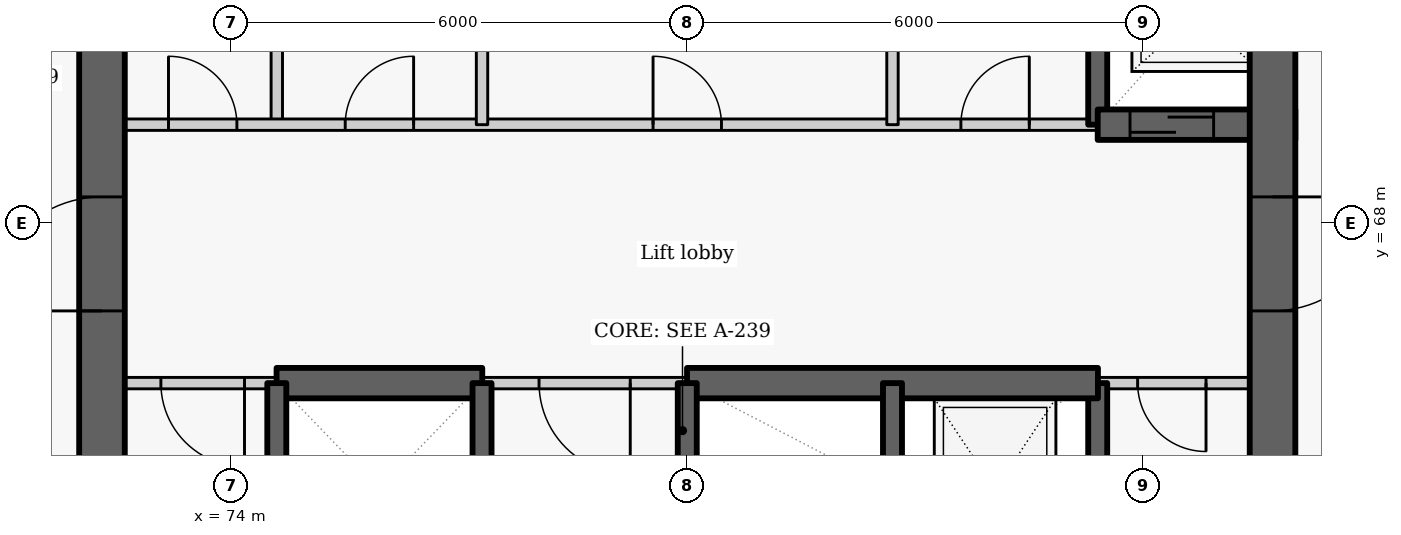
"""IFC4 building model, lengths in metres.
Left out: names, types, materials, properties, quantities, classifications, styles, units other than length and angle.
Written with IfcOpenShell. Run it as: python <this file> out.ifc"""

import sys

from ifc_helpers import new_model, si_unit, direction, frame, frame_2d, origin, place, context, subcontext, project, spatial, rectangle, extrude, element, fill, save


model = new_model("IFC4")
c1 = context("Model", 3, precision=1e-05, world=origin(), true_north=direction((0.0, 1.0)))
c2 = subcontext(c1, "Body", "Model", "MODEL_VIEW")
j1 = project(units=[si_unit("LENGTHUNIT", "METRE"), si_unit("PLANEANGLEUNIT", "RADIAN")], contexts=[c1])
p1 = place(None, origin())
s1 = spatial("IfcSite", under=j1, at=p1, CompositionType="ELEMENT")
p2 = place(p1, origin())
s2 = spatial("IfcBuilding", under=s1, at=p2, CompositionType="ELEMENT")
p3 = place(p2, frame((0.0, 0.0, 226.2)))
s3 = spatial("IfcBuildingStorey", under=s2, at=p3, CompositionType="ELEMENT", Elevation=226.2)
p4 = place(p3, frame((74.6, 69.3, 0.0), z_axis=(0.0, 0.0, 1.0), x_axis=(0.0, 1.0, 0.0)))
e1 = element("IfcWall", 1, at=p4, inside=s3, PredefinedType="PARTITIONING", context=c2, shape_type="SweptSolid", body=[
    extrude(rectangle(XDim=2.9, YDim=0.15, at=frame_2d((1.45, 0.0))), origin(), (0.0, 0.0, 1.0), 3.025),
])
p5 = place(p3, frame((72.0, 69.3, 0.0), z_axis=(0.0, 0.0, 1.0), x_axis=(1.0, 0.0, 0.0)))
e2 = element("IfcWall", 2, at=p5, inside=s3, PredefinedType="PARTITIONING", context=c2, shape_type="SweptSolid", body=[
    extrude(rectangle(XDim=13.4, YDim=0.15, at=frame_2d((6.7, 0.0))), origin(), (0.0, 0.0, 1.0), 3.025),
])
p6 = place(p5, frame((1.175, 0.0, 0.0)))
e3 = element("IfcOpeningElement", 3, at=p6, cuts=e2, PredefinedType="OPENING", context=c2, shape_type="SweptSolid", body=[
    extrude(rectangle(XDim=0.9, YDim=2.1, at=frame_2d((0.45, 1.05))), frame((0.0, 0.085, 0.0), z_axis=(0.0, -1.0, 0.0), x_axis=(1.0, 0.0, 0.0)), (0.0, 0.0, 1.0), 0.17),
])
p7 = place(p5, frame((3.5, 0.0, 0.0)))
e4 = element("IfcOpeningElement", 4, at=p7, cuts=e2, PredefinedType="OPENING", context=c2, shape_type="SweptSolid", body=[
    extrude(rectangle(XDim=0.9, YDim=2.1, at=frame_2d((0.45, 1.05))), frame((0.0, 0.085, 0.0), z_axis=(0.0, -1.0, 0.0), x_axis=(1.0, 0.0, 0.0)), (0.0, 0.0, 1.0), 0.17),
])
p8 = place(p5, frame((7.55, 0.0, 0.0)))
e5 = element("IfcOpeningElement", 5, at=p8, cuts=e2, PredefinedType="OPENING", context=c2, shape_type="SweptSolid", body=[
    extrude(rectangle(XDim=0.9, YDim=2.1, at=frame_2d((0.45, 1.05))), frame((0.0, 0.085, 0.0), z_axis=(0.0, -1.0, 0.0), x_axis=(1.0, 0.0, 0.0)), (0.0, 0.0, 1.0), 0.17),
])
p9 = place(p5, frame((11.6, 0.0, 0.0)))
e6 = element("IfcOpeningElement", 6, at=p9, cuts=e2, PredefinedType="OPENING", context=c2, shape_type="SweptSolid", body=[
    extrude(rectangle(XDim=0.9, YDim=2.1, at=frame_2d((0.45, 1.05))), frame((0.0, 0.085, 0.0), z_axis=(0.0, -1.0, 0.0), x_axis=(1.0, 0.0, 0.0)), (0.0, 0.0, 1.0), 0.17),
])
p10 = place(p3, frame((72.3, 63.1, -0.41), z_axis=(0.0, 0.0, 1.0), x_axis=(0.0, 1.0, 0.0)))
e7 = element("IfcWall", 7, at=p10, inside=s3, PredefinedType="SHEAR", context=c2, shape_type="SweptSolid", body=[
    extrude(rectangle(XDim=9.1, YDim=0.6, at=frame_2d((4.55, 0.0))), origin(), (0.0, 0.0, 1.0), 3.435),
])
p11 = place(p10, frame((3.75, 0.0, 0.41)))
e8 = element("IfcOpeningElement", 8, at=p11, cuts=e7, PredefinedType="OPENING", context=c2, shape_type="SweptSolid", body=[
    extrude(rectangle(XDim=1.5, YDim=2.1, at=frame_2d((0.75, 1.05))), frame((0.0, 0.31, 0.0), z_axis=(0.0, -1.0, 0.0), x_axis=(1.0, 0.0, 0.0)), (0.0, 0.0, 1.0), 0.62),
])
p12 = place(p3, frame((85.4, 63.1, -0.41), z_axis=(0.0, 0.0, 1.0), x_axis=(0.0, 1.0, 0.0)))
e9 = element("IfcWall", 9, at=p12, inside=s3, PredefinedType="SHEAR", context=c2, shape_type="SweptSolid", body=[
    extrude(rectangle(XDim=2.8, YDim=0.25, at=frame_2d((1.4, 0.0))), origin(), (0.0, 0.0, 1.0), 3.435),
])
p13 = place(p3, frame((85.4, 69.3, -0.41), z_axis=(0.0, 0.0, 1.0), x_axis=(0.0, 1.0, 0.0)))
e10 = element("IfcWall", 10, at=p13, inside=s3, PredefinedType="SHEAR", context=c2, shape_type="SweptSolid", body=[
    extrude(rectangle(XDim=2.9, YDim=0.25, at=frame_2d((1.45, 0.0))), origin(), (0.0, 0.0, 1.0), 3.435),
])
p14 = place(p3, frame((85.4, 69.3, -0.41), z_axis=(0.0, 0.0, 1.0), x_axis=(1.0, 0.0, 0.0)))
e11 = element("IfcWall", 11, at=p14, inside=s3, PredefinedType="SHEAR", context=c2, shape_type="SweptSolid", body=[
    extrude(rectangle(XDim=2.6, YDim=0.4, at=frame_2d((1.3, 0.0))), origin(), (0.0, 0.0, 1.0), 3.435),
])
p15 = place(p14, frame((0.425, 0.0, 0.41)))
e12 = element("IfcOpeningElement", 12, at=p15, cuts=e11, PredefinedType="OPENING", context=c2, shape_type="SweptSolid", body=[
    extrude(rectangle(XDim=1.1, YDim=2.1, at=frame_2d((0.55, 1.05))), frame((0.0, 0.21, 0.0), z_axis=(0.0, -1.0, 0.0), x_axis=(1.0, 0.0, 0.0)), (0.0, 0.0, 1.0), 0.42),
])
p16 = place(p3, frame((87.7, 72.2, -0.41), z_axis=(0.0, 0.0, 1.0), x_axis=(0.0, -1.0, 0.0)))
e13 = element("IfcWall", 13, at=p16, inside=s3, PredefinedType="SHEAR", context=c2, shape_type="SweptSolid", body=[
    extrude(rectangle(XDim=14.25, YDim=0.6, at=frame_2d((7.125, 0.0))), origin(), (0.0, 0.0, 1.0), 3.435),
])
p17 = place(p16, frame((3.85, 0.0, 0.41)))
e14 = element("IfcOpeningElement", 14, at=p17, cuts=e13, PredefinedType="OPENING", context=c2, shape_type="SweptSolid", body=[
    extrude(rectangle(XDim=1.5, YDim=2.1, at=frame_2d((0.75, 1.05))), frame((0.0, 0.31, 0.0), z_axis=(0.0, -1.0, 0.0), x_axis=(1.0, 0.0, 0.0)), (0.0, 0.0, 1.0), 0.62),
])
p18 = place(p16, frame((11.125, 0.0, 0.41)))
e15 = element("IfcOpeningElement", 15, at=p18, cuts=e13, PredefinedType="OPENING", context=c2, shape_type="SweptSolid", body=[
    extrude(rectangle(XDim=1.1, YDim=2.1, at=frame_2d((0.55, 1.05))), frame((0.0, 0.31, 0.0), z_axis=(0.0, -1.0, 0.0), x_axis=(1.0, 0.0, 0.0)), (0.0, 0.0, 1.0), 0.62),
])
for number, where, z_axis, x_axis in (
    (16, (77.3, 69.3, 0.0), (0.0, 0.0, 1.0), (0.0, 1.0, 0.0)),
    (17, (82.7, 69.3, 0.0), (0.0, 0.0, 1.0), (0.0, 1.0, 0.0)),
):
    element("IfcWall", number, at=place(p3, frame(where, z_axis=z_axis, x_axis=x_axis)), inside=s3, PredefinedType="PARTITIONING", context=c2, shape_type="SweptSolid", body=[
        extrude(rectangle(XDim=2.9, YDim=0.15, at=frame_2d((1.45, 0.0))), origin(), (0.0, 0.0, 1.0), 3.025),
    ])
p19 = place(p3, frame((74.603, 65.9, 0.0), z_axis=(0.0, 0.0, 1.0), x_axis=(-1.0, 0.0, 0.0)))
e18 = element("IfcWall", 18, at=p19, inside=s3, PredefinedType="PARTITIONING", context=c2, shape_type="SweptSolid", body=[
    extrude(rectangle(XDim=2.603, YDim=0.15, at=frame_2d((1.302, 0.0))), origin(), (0.0, 0.0, 1.0), 3.025),
])
p20 = place(p19, frame((0.428, 0.0, 0.0)))
e19 = element("IfcOpeningElement", 19, at=p20, cuts=e18, PredefinedType="OPENING", context=c2, shape_type="SweptSolid", body=[
    extrude(rectangle(XDim=1.1, YDim=2.1, at=frame_2d((0.55, 1.05))), frame((0.0, 0.085, 0.0), z_axis=(0.0, -1.0, 0.0), x_axis=(1.0, 0.0, 0.0)), (0.0, 0.0, 1.0), 0.17),
])
p21 = place(p3, frame((80.003, 65.9, 0.0), z_axis=(0.0, 0.0, 1.0), x_axis=(-1.0, 0.0, 0.0)))
e20 = element("IfcWall", 20, at=p21, inside=s3, PredefinedType="PARTITIONING", context=c2, shape_type="SweptSolid", body=[
    extrude(rectangle(XDim=2.706, YDim=0.15, at=frame_2d((1.353, 0.0))), origin(), (0.0, 0.0, 1.0), 3.025),
])
p22 = place(p21, frame((0.753, 0.0, 0.0)))
e21 = element("IfcOpeningElement", 21, at=p22, cuts=e20, PredefinedType="OPENING", context=c2, shape_type="SweptSolid", body=[
    extrude(rectangle(XDim=1.2, YDim=2.1, at=frame_2d((0.6, 1.05))), frame((0.0, 0.085, 0.0), z_axis=(0.0, -1.0, 0.0), x_axis=(1.0, 0.0, 0.0)), (0.0, 0.0, 1.0), 0.17),
])
p23 = place(p3, frame((88.0, 65.9, 0.0), z_axis=(0.0, 0.0, 1.0), x_axis=(-1.0, 0.0, 0.0)))
e22 = element("IfcWall", 22, at=p23, inside=s3, PredefinedType="PARTITIONING", context=c2, shape_type="SweptSolid", body=[
    extrude(rectangle(XDim=2.603, YDim=0.15, at=frame_2d((1.302, 0.0))), origin(), (0.0, 0.0, 1.0), 3.025),
])
p24 = place(p23, frame((1.175, 0.0, 0.0)))
e23 = element("IfcOpeningElement", 23, at=p24, cuts=e22, PredefinedType="OPENING", context=c2, shape_type="SweptSolid", body=[
    extrude(rectangle(XDim=0.9, YDim=2.1, at=frame_2d((0.45, 1.05))), frame((0.0, 0.085, 0.0), z_axis=(0.0, -1.0, 0.0), x_axis=(1.0, 0.0, 0.0)), (0.0, 0.0, 1.0), 0.17),
])
p25 = place(p3, frame((74.597, 65.9, -0.41), z_axis=(0.0, 0.0, 1.0), x_axis=(1.0, 0.0, 0.0)))
e24 = element("IfcWall", 24, at=p25, inside=s3, PredefinedType="SHEAR", context=c2, shape_type="SweptSolid", body=[
    extrude(rectangle(XDim=2.706, YDim=0.4, at=frame_2d((1.353, 0.0))), origin(), (0.0, 0.0, 1.0), 3.435),
])
p26 = place(p3, frame((79.997, 65.9, -0.41), z_axis=(0.0, 0.0, 1.0), x_axis=(1.0, 0.0, 0.0)))
e25 = element("IfcWall", 25, at=p26, inside=s3, PredefinedType="SHEAR", context=c2, shape_type="SweptSolid", body=[
    extrude(rectangle(XDim=5.406, YDim=0.4, at=frame_2d((2.703, 0.0))), origin(), (0.0, 0.0, 1.0), 3.435),
])
for number, where, z_axis, x_axis in (
    (26, (74.6, 63.1, -0.41), (0.0, 0.0, 1.0), (0.0, 1.0, 0.0)),
    (27, (77.3, 63.1, -0.41), (0.0, 0.0, 1.0), (0.0, 1.0, 0.0)),
    (28, (80.0, 63.1, -0.41), (0.0, 0.0, 1.0), (0.0, 1.0, 0.0)),
    (29, (82.7, 63.1, -0.41), (0.0, 0.0, 1.0), (0.0, 1.0, 0.0)),
):
    element("IfcWall", number, at=place(p3, frame(where, z_axis=z_axis, x_axis=x_axis)), inside=s3, PredefinedType="SHEAR", context=c2, shape_type="SweptSolid", body=[
        extrude(rectangle(XDim=2.8, YDim=0.25, at=frame_2d((1.4, 0.0))), origin(), (0.0, 0.0, 1.0), 3.435),
    ])
p27 = place(p6, origin())
e30 = element("IfcDoor", 30, at=p27, inside=s3, OperationType="SINGLE_SWING_LEFT", PredefinedType="DOOR", context=c2, shape_type="SweptSolid", body=[
    extrude(rectangle(XDim=0.9, YDim=2.1, at=frame_2d((0.45, 1.05))), frame((0.0, 0.025, 0.0), z_axis=(0.0, -1.0, 0.0), x_axis=(1.0, 0.0, 0.0)), (0.0, 0.0, 1.0), 0.05),
])
fill(e3, e30)
p28 = place(p15, origin())
e31 = element("IfcDoor", 31, at=p28, inside=s3, OperationType="SLIDING_TO_LEFT", PredefinedType="DOOR", context=c2, shape_type="SweptSolid", body=[
    extrude(rectangle(XDim=1.1, YDim=2.1, at=frame_2d((0.55, 1.05))), frame((0.0, 0.025, 0.0), z_axis=(0.0, -1.0, 0.0), x_axis=(1.0, 0.0, 0.0)), (0.0, 0.0, 1.0), 0.05),
])
fill(e12, e31)
p29 = place(p7, origin())
e32 = element("IfcDoor", 32, at=p29, inside=s3, OperationType="SINGLE_SWING_RIGHT", PredefinedType="DOOR", context=c2, shape_type="SweptSolid", body=[
    extrude(rectangle(XDim=0.9, YDim=2.1, at=frame_2d((0.45, 1.05))), frame((0.0, 0.025, 0.0), z_axis=(0.0, -1.0, 0.0), x_axis=(1.0, 0.0, 0.0)), (0.0, 0.0, 1.0), 0.05),
])
fill(e4, e32)
p30 = place(p8, origin())
e33 = element("IfcDoor", 33, at=p30, inside=s3, OperationType="SINGLE_SWING_LEFT", PredefinedType="DOOR", context=c2, shape_type="SweptSolid", body=[
    extrude(rectangle(XDim=0.9, YDim=2.1, at=frame_2d((0.45, 1.05))), frame((0.0, 0.025, 0.0), z_axis=(0.0, -1.0, 0.0), x_axis=(1.0, 0.0, 0.0)), (0.0, 0.0, 1.0), 0.05),
])
fill(e5, e33)
p31 = place(p9, origin())
e34 = element("IfcDoor", 34, at=p31, inside=s3, OperationType="SINGLE_SWING_RIGHT", PredefinedType="DOOR", context=c2, shape_type="SweptSolid", body=[
    extrude(rectangle(XDim=0.9, YDim=2.1, at=frame_2d((0.45, 1.05))), frame((0.0, 0.025, 0.0), z_axis=(0.0, -1.0, 0.0), x_axis=(1.0, 0.0, 0.0)), (0.0, 0.0, 1.0), 0.05),
])
fill(e6, e34)
p32 = place(p20, origin())
e35 = element("IfcDoor", 35, at=p32, inside=s3, OperationType="SINGLE_SWING_LEFT", PredefinedType="DOOR", context=c2, shape_type="SweptSolid", body=[
    extrude(rectangle(XDim=1.1, YDim=2.1, at=frame_2d((0.55, 1.05))), frame((0.0, 0.025, 0.0), z_axis=(0.0, -1.0, 0.0), x_axis=(1.0, 0.0, 0.0)), (0.0, 0.0, 1.0), 0.05),
])
fill(e19, e35)
p33 = place(p22, origin())
e36 = element("IfcDoor", 36, at=p33, inside=s3, OperationType="DOUBLE_DOOR_SINGLE_SWING", PredefinedType="DOOR", context=c2, shape_type="SweptSolid", body=[
    extrude(rectangle(XDim=1.2, YDim=2.1, at=frame_2d((0.6, 1.05))), frame((0.0, 0.025, 0.0), z_axis=(0.0, -1.0, 0.0), x_axis=(1.0, 0.0, 0.0)), (0.0, 0.0, 1.0), 0.05),
])
fill(e21, e36)
p34 = place(p24, origin())
e37 = element("IfcDoor", 37, at=p34, inside=s3, OperationType="SINGLE_SWING_LEFT", PredefinedType="DOOR", context=c2, shape_type="SweptSolid", body=[
    extrude(rectangle(XDim=0.9, YDim=2.1, at=frame_2d((0.45, 1.05))), frame((0.0, 0.025, 0.0), z_axis=(0.0, -1.0, 0.0), x_axis=(1.0, 0.0, 0.0)), (0.0, 0.0, 1.0), 0.05),
])
fill(e23, e37)
p35 = place(p17, origin())
e38 = element("IfcDoor", 38, at=p35, inside=s3, OperationType="DOUBLE_DOOR_SINGLE_SWING", PredefinedType="DOOR", context=c2, shape_type="SweptSolid", body=[
    extrude(rectangle(XDim=1.5, YDim=2.1, at=frame_2d((0.75, 1.05))), frame((0.0, 0.025, 0.0), z_axis=(0.0, -1.0, 0.0), x_axis=(1.0, 0.0, 0.0)), (0.0, 0.0, 1.0), 0.05),
])
fill(e14, e38)
p36 = place(p11, origin())
e39 = element("IfcDoor", 39, at=p36, inside=s3, OperationType="DOUBLE_DOOR_SINGLE_SWING", PredefinedType="DOOR", context=c2, shape_type="SweptSolid", body=[
    extrude(rectangle(XDim=1.5, YDim=2.1, at=frame_2d((0.75, 1.05))), frame((0.0, 0.025, 0.0), z_axis=(0.0, -1.0, 0.0), x_axis=(1.0, 0.0, 0.0)), (0.0, 0.0, 1.0), 0.05),
])
fill(e8, e39)
save(model, sys.argv[1])
